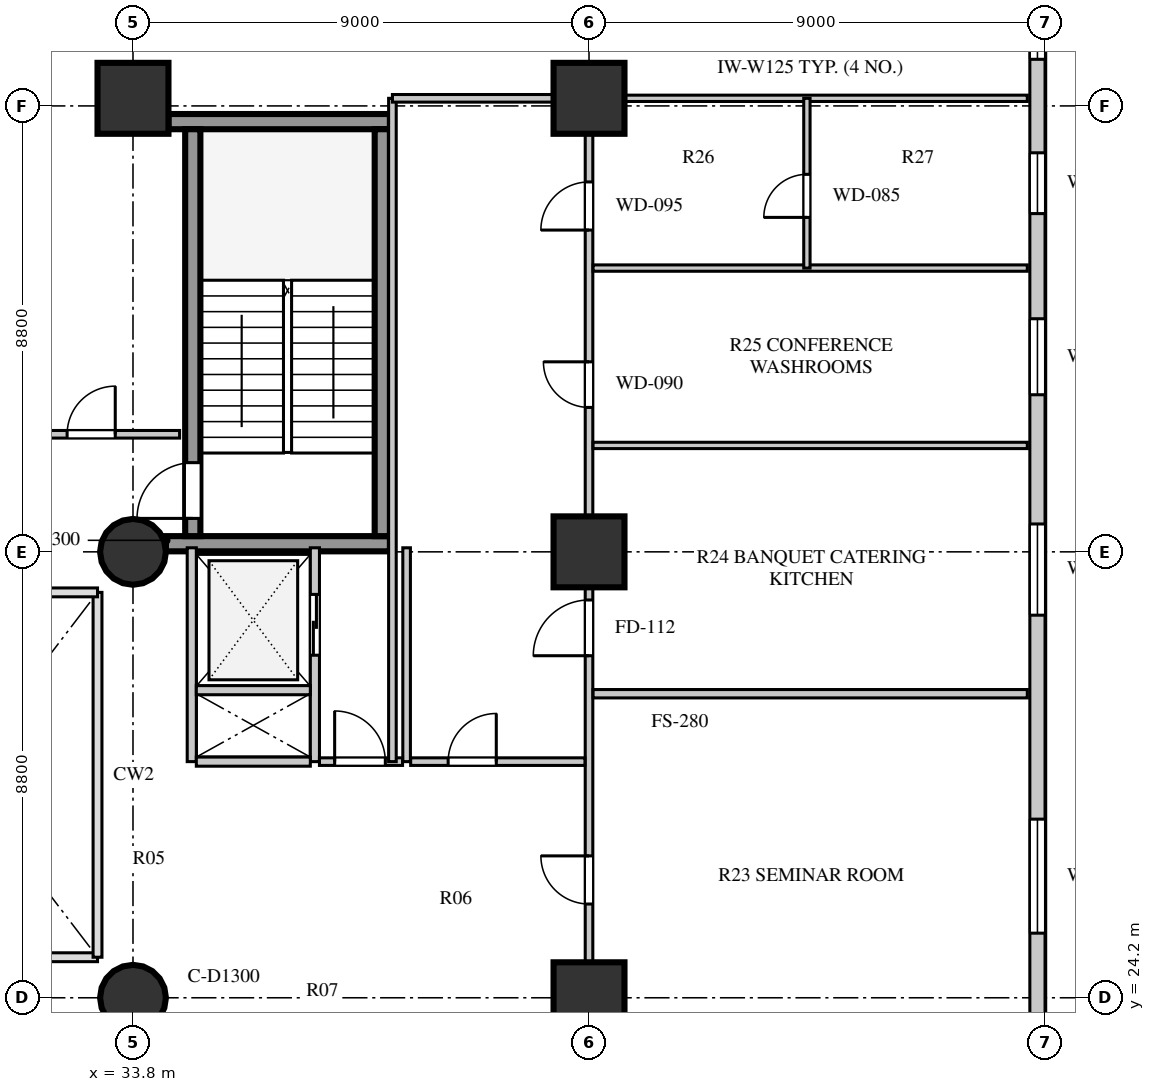
"""IFC4 building model, lengths in metres.
Left out: names, types, materials, properties, quantities, classifications, styles, units other than length and angle.
Written with IfcOpenShell. Run it as: python <this file> out.ifc"""

import sys

from ifc_helpers import new_model, si_unit, direction, frame, frame_2d, origin, origin_2d, place, context, subcontext, project, spatial, rectangle, circle, extrude, element, fill, save


model = new_model("IFC4")
c1 = context("Model", 3, precision=1e-05, world=origin(), true_north=direction((0.0, 1.0)))
c2 = subcontext(c1, "Body", "Model", "MODEL_VIEW")
j1 = project(units=[si_unit("LENGTHUNIT", "METRE"), si_unit("PLANEANGLEUNIT", "RADIAN")], contexts=[c1])
p1 = place(None, origin())
s1 = spatial("IfcSite", under=j1, at=p1, CompositionType="ELEMENT")
p2 = place(p1, origin())
s2 = spatial("IfcBuilding", under=s1, at=p2, CompositionType="ELEMENT")
p3 = place(p2, frame((0.0, 0.0, 21.5)))
s3 = spatial("IfcBuildingStorey", under=s2, at=p3, CompositionType="ELEMENT", Elevation=21.5)
p4 = place(p3, frame((34.45, 33.16, 0.0), z_axis=(0.0, 0.0, 1.0), x_axis=(1.0, 0.0, 0.0)))
e1 = element("IfcWall", 1, at=p4, inside=s3, PredefinedType="SHEAR", context=c2, shape_type="SweptSolid", body=[
    extrude(rectangle(XDim=4.42, YDim=0.3, at=frame_2d((2.21, 0.0))), origin(), (0.0, 0.0, 1.0), 4.22),
])
p5 = place(p3, frame((34.5, 41.49, 0.0), z_axis=(0.0, 0.0, 1.0), x_axis=(1.0, 0.0, 0.0)))
e2 = element("IfcWall", 2, at=p5, inside=s3, PredefinedType="SHEAR", context=c2, shape_type="SweptSolid", body=[
    extrude(rectangle(XDim=4.37, YDim=0.3, at=frame_2d((2.185, 0.0))), origin(), (0.0, 0.0, 1.0), 4.22),
])
p6 = place(p3, frame((34.98, 33.31, 0.0), z_axis=(0.0, 0.0, 1.0), x_axis=(0.0, 1.0, 0.0)))
e3 = element("IfcWall", 3, at=p6, inside=s3, PredefinedType="SHEAR", context=c2, shape_type="SweptSolid", body=[
    extrude(rectangle(XDim=8.03, YDim=0.3, at=frame_2d((4.015, 0.0))), origin(), (0.0, 0.0, 1.0), 4.22),
])
p7 = place(p6, frame((0.35, 0.0, 0.0)))
e4 = element("IfcOpeningElement", 4, at=p7, cuts=e3, PredefinedType="OPENING", context=c2, shape_type="SweptSolid", body=[
    extrude(rectangle(XDim=1.1, YDim=2.1, at=frame_2d((0.55, 1.05))), frame((0.0, 0.16, 0.0), z_axis=(0.0, -1.0, 0.0), x_axis=(1.0, 0.0, 0.0)), (0.0, 0.0, 1.0), 0.32),
])
p8 = place(p3, frame((38.72, 33.31, 0.0), z_axis=(0.0, 0.0, 1.0), x_axis=(0.0, 1.0, 0.0)))
e5 = element("IfcWall", 5, at=p8, inside=s3, PredefinedType="SHEAR", context=c2, shape_type="SweptSolid", body=[
    extrude(rectangle(XDim=8.03, YDim=0.3, at=frame_2d((4.015, 0.0))), origin(), (0.0, 0.0, 1.0), 4.22),
])
for number, where, z_axis, x_axis in (
    (6, (33.8, 24.2, 0.0), (0.0, 0.0, 1.0), (1.0, 0.0, 0.0)),
    (7, (33.8, 33.0, 0.0), (0.0, 0.0, 1.0), (1.0, 0.0, 0.0)),
):
    element("IfcColumn", number, at=place(p3, frame(where, z_axis=z_axis, x_axis=x_axis)), inside=s3, PredefinedType="COLUMN", context=c2, shape_type="SweptSolid", body=[
        extrude(circle(Radius=0.65, at=origin_2d()), origin(), (0.0, 0.0, 1.0), 4.22),
    ])
for number, where, z_axis, x_axis in (
    (8, (33.8, 41.95, 0.0), (0.0, 0.0, 1.0), (1.0, 0.0, 0.0)),
    (9, (42.8, 24.2, 0.0), (0.0, 0.0, 1.0), (1.0, 0.0, 0.0)),
    (10, (42.8, 33.0, 0.0), (0.0, 0.0, 1.0), (1.0, 0.0, 0.0)),
    (11, (42.8, 41.95, 0.0), (0.0, 0.0, 1.0), (1.0, 0.0, 0.0)),
):
    element("IfcColumn", number, at=place(p3, frame(where, z_axis=z_axis, x_axis=x_axis)), inside=s3, PredefinedType="COLUMN", context=c2, shape_type="SweptSolid", body=[
        extrude(rectangle(XDim=1.4, YDim=1.4, at=origin_2d()), origin(), (0.0, 0.0, 1.0), 4.22),
    ])
p9 = place(p3, frame((51.65, 12.4, 0.0), z_axis=(0.0, 0.0, 1.0), x_axis=(0.0, 1.0, 0.0)))
e12 = element("IfcWall", 12, at=p9, inside=s3, PredefinedType="STANDARD", context=c2, shape_type="SweptSolid", body=[
    extrude(rectangle(XDim=32.4, YDim=0.3, at=frame_2d((16.2, 0.0))), origin(), (0.0, 0.0, 1.0), 4.22),
])
p10 = place(p9, frame((0.655, 0.0, 0.8)))
e13 = element("IfcOpeningElement", 13, at=p10, cuts=e12, PredefinedType="OPENING", context=c2, shape_type="SweptSolid", body=[
    extrude(rectangle(XDim=1.65, YDim=1.95, at=frame_2d((0.825, 0.975))), frame((0.0, 0.16, 0.0), z_axis=(0.0, -1.0, 0.0), x_axis=(1.0, 0.0, 0.0)), (0.0, 0.0, 1.0), 0.32),
])
p11 = place(p9, frame((5.75, 0.0, 0.8)))
e14 = element("IfcOpeningElement", 14, at=p11, cuts=e12, PredefinedType="OPENING", context=c2, shape_type="SweptSolid", body=[
    extrude(rectangle(XDim=1.95, YDim=2.0, at=frame_2d((0.975, 1.0))), frame((0.0, 0.16, 0.0), z_axis=(0.0, -1.0, 0.0), x_axis=(1.0, 0.0, 0.0)), (0.0, 0.0, 1.0), 0.32),
])
p12 = place(p9, frame((13.075, 0.0, 0.8)))
e15 = element("IfcOpeningElement", 15, at=p12, cuts=e12, PredefinedType="OPENING", context=c2, shape_type="SweptSolid", body=[
    extrude(rectangle(XDim=2.25, YDim=2.0, at=frame_2d((1.125, 1.0))), frame((0.0, 0.16, 0.0), z_axis=(0.0, -1.0, 0.0), x_axis=(1.0, 0.0, 0.0)), (0.0, 0.0, 1.0), 0.32),
])
p13 = place(p9, frame((19.35, 0.0, 0.8)))
e16 = element("IfcOpeningElement", 16, at=p13, cuts=e12, PredefinedType="OPENING", context=c2, shape_type="SweptSolid", body=[
    extrude(rectangle(XDim=1.8, YDim=2.0, at=frame_2d((0.9, 1.0))), frame((0.0, 0.16, 0.0), z_axis=(0.0, -1.0, 0.0), x_axis=(1.0, 0.0, 0.0)), (0.0, 0.0, 1.0), 0.32),
])
p14 = place(p9, frame((23.7, 0.0, 0.8)))
e17 = element("IfcOpeningElement", 17, at=p14, cuts=e12, PredefinedType="OPENING", context=c2, shape_type="SweptSolid", body=[
    extrude(rectangle(XDim=1.5, YDim=2.0, at=frame_2d((0.75, 1.0))), frame((0.0, 0.16, 0.0), z_axis=(0.0, -1.0, 0.0), x_axis=(1.0, 0.0, 0.0)), (0.0, 0.0, 1.0), 0.32),
])
p15 = place(p9, frame((27.275, 0.0, 0.8)))
e18 = element("IfcOpeningElement", 18, at=p15, cuts=e12, PredefinedType="OPENING", context=c2, shape_type="SweptSolid", body=[
    extrude(rectangle(XDim=1.2, YDim=1.75, at=frame_2d((0.6, 0.875))), frame((0.0, 0.16, 0.0), z_axis=(0.0, -1.0, 0.0), x_axis=(1.0, 0.0, 0.0)), (0.0, 0.0, 1.0), 0.32),
])
p16 = place(p9, frame((30.32, 0.0, 0.8)))
e19 = element("IfcOpeningElement", 19, at=p16, cuts=e12, PredefinedType="OPENING", context=c2, shape_type="SweptSolid", body=[
    extrude(rectangle(XDim=1.2, YDim=1.75, at=frame_2d((0.6, 0.875))), frame((0.0, 0.16, 0.0), z_axis=(0.0, -1.0, 0.0), x_axis=(1.0, 0.0, 0.0)), (0.0, 0.0, 1.0), 0.32),
])
p17 = place(p3, frame((34.96, 28.86, 0.0), z_axis=(0.0, 0.0, 1.0), x_axis=(0.0, 1.0, 0.0)))
e20 = element("IfcWall", 20, at=p17, inside=s3, PredefinedType="SOLIDWALL", context=c2, shape_type="SweptSolid", body=[
    extrude(rectangle(XDim=4.22, YDim=0.18, at=frame_2d((2.11, 0.0))), origin(), (0.0, 0.0, 1.0), 4.22),
])
p18 = place(p3, frame((37.39, 28.86, 0.0), z_axis=(0.0, 0.0, 1.0), x_axis=(0.0, 1.0, 0.0)))
e21 = element("IfcWall", 21, at=p18, inside=s3, PredefinedType="SOLIDWALL", context=c2, shape_type="SweptSolid", body=[
    extrude(rectangle(XDim=4.22, YDim=0.18, at=frame_2d((2.11, 0.0))), origin(), (0.0, 0.0, 1.0), 4.22),
])
p19 = place(p18, frame((2.1, 0.0, 0.0)))
e22 = element("IfcOpeningElement", 22, at=p19, cuts=e21, PredefinedType="OPENING", context=c2, shape_type="SweptSolid", body=[
    extrude(rectangle(XDim=1.2, YDim=2.12, at=frame_2d((0.6, 1.06))), frame((0.0, 0.1, 0.0), z_axis=(0.0, -1.0, 0.0), x_axis=(1.0, 0.0, 0.0)), (0.0, 0.0, 1.0), 0.2),
])
for number, where, z_axis, x_axis in (
    (23, (35.05, 28.86, 0.0), (0.0, 0.0, 1.0), (1.0, 0.0, 0.0)),
    (24, (35.05, 30.27, 0.0), (0.0, 0.0, 1.0), (1.0, 0.0, 0.0)),
):
    element("IfcWall", number, at=place(p3, frame(where, z_axis=z_axis, x_axis=x_axis)), inside=s3, PredefinedType="SOLIDWALL", context=c2, shape_type="SweptSolid", body=[
        extrude(rectangle(XDim=2.25, YDim=0.18, at=frame_2d((1.125, 0.0))), origin(), (0.0, 0.0, 1.0), 4.22),
    ])
p20 = place(p3, frame((39.2, 28.86, 0.0), z_axis=(0.0, 0.0, 1.0), x_axis=(0.0, 1.0, 0.0)))
e25 = element("IfcWall", 25, at=p20, inside=s3, PredefinedType="PARTITIONING", context=c2, shape_type="SweptSolid", body=[
    extrude(rectangle(XDim=4.22, YDim=0.15, at=frame_2d((2.11, 0.0))), origin(), (0.0, 0.0, 1.0), 4.22),
])
p21 = place(p3, frame((37.48, 28.86, 0.0), z_axis=(0.0, 0.0, 1.0), x_axis=(1.0, 0.0, 0.0)))
e26 = element("IfcWall", 26, at=p21, inside=s3, PredefinedType="PARTITIONING", context=c2, shape_type="SweptSolid", body=[
    extrude(rectangle(XDim=1.64, YDim=0.15, at=frame_2d((0.82, 0.0))), origin(), (0.0, 0.0, 1.0), 4.22),
])
p22 = place(p21, frame((0.3, 0.0, 0.0)))
e27 = element("IfcOpeningElement", 27, at=p22, cuts=e26, PredefinedType="OPENING", context=c2, shape_type="SweptSolid", body=[
    extrude(rectangle(XDim=1.0, YDim=2.1, at=frame_2d((0.5, 1.05))), frame((0.0, 0.085, 0.0), z_axis=(0.0, -1.0, 0.0), x_axis=(1.0, 0.0, 0.0)), (0.0, 0.0, 1.0), 0.17),
])
p23 = place(p3, frame((27.5, 35.32, 0.0), z_axis=(0.0, 0.0, 1.0), x_axis=(1.0, 0.0, 0.0)))
e28 = element("IfcWall", 28, at=p23, inside=s3, PredefinedType="PARTITIONING", context=c2, shape_type="SweptSolid", body=[
    extrude(rectangle(XDim=7.22, YDim=0.15, at=frame_2d((3.61, 0.0))), origin(), (0.0, 0.0, 1.0), 4.22),
])
p24 = place(p23, frame((5.0, 0.0, 0.0)))
e29 = element("IfcOpeningElement", 29, at=p24, cuts=e28, PredefinedType="OPENING", context=c2, shape_type="SweptSolid", body=[
    extrude(rectangle(XDim=0.95, YDim=2.08, at=frame_2d((0.475, 1.04))), frame((0.0, 0.085, 0.0), z_axis=(0.0, -1.0, 0.0), x_axis=(1.0, 0.0, 0.0)), (0.0, 0.0, 1.0), 0.17),
])
p25 = place(p23, frame((2.0, 0.0, 0.0)))
e30 = element("IfcOpeningElement", 30, at=p25, cuts=e28, PredefinedType="OPENING", context=c2, shape_type="SweptSolid", body=[
    extrude(rectangle(XDim=1.35, YDim=2.1, at=frame_2d((0.675, 1.05))), frame((0.0, 0.085, 0.0), z_axis=(0.0, -1.0, 0.0), x_axis=(1.0, 0.0, 0.0)), (0.0, 0.0, 1.0), 0.17),
])
p26 = place(p3, frame((42.8, 15.25, 0.0), z_axis=(0.0, 0.0, 1.0), x_axis=(0.0, 1.0, 0.0)))
e31 = element("IfcWall", 31, at=p26, inside=s3, PredefinedType="PARTITIONING", context=c2, shape_type="SweptSolid", body=[
    extrude(rectangle(XDim=26.7, YDim=0.15, at=frame_2d((13.35, 0.0))), origin(), (0.0, 0.0, 1.0), 3.42),
])
p27 = place(p26, frame((2.6, 0.0, 0.0)))
e32 = element("IfcOpeningElement", 32, at=p27, cuts=e31, PredefinedType="OPENING", context=c2, shape_type="SweptSolid", body=[
    extrude(rectangle(XDim=0.95, YDim=2.08, at=frame_2d((0.475, 1.04))), frame((0.0, 0.085, 0.0), z_axis=(0.0, -1.0, 0.0), x_axis=(1.0, 0.0, 0.0)), (0.0, 0.0, 1.0), 0.17),
])
p28 = place(p26, frame((10.8, 0.0, 0.0)))
e33 = element("IfcOpeningElement", 33, at=p28, cuts=e31, PredefinedType="OPENING", context=c2, shape_type="SweptSolid", body=[
    extrude(rectangle(XDim=0.95, YDim=2.08, at=frame_2d((0.475, 1.04))), frame((0.0, 0.085, 0.0), z_axis=(0.0, -1.0, 0.0), x_axis=(1.0, 0.0, 0.0)), (0.0, 0.0, 1.0), 0.17),
])
p29 = place(p26, frame((15.7, 0.0, 0.0)))
e34 = element("IfcOpeningElement", 34, at=p29, cuts=e31, PredefinedType="OPENING", context=c2, shape_type="SweptSolid", body=[
    extrude(rectangle(XDim=1.1, YDim=2.12, at=frame_2d((0.55, 1.06))), frame((0.0, 0.085, 0.0), z_axis=(0.0, -1.0, 0.0), x_axis=(1.0, 0.0, 0.0)), (0.0, 0.0, 1.0), 0.17),
])
p30 = place(p26, frame((20.6, 0.0, 0.0)))
e35 = element("IfcOpeningElement", 35, at=p30, cuts=e31, PredefinedType="OPENING", context=c2, shape_type="SweptSolid", body=[
    extrude(rectangle(XDim=0.9, YDim=2.05, at=frame_2d((0.45, 1.025))), frame((0.0, 0.085, 0.0), z_axis=(0.0, -1.0, 0.0), x_axis=(1.0, 0.0, 0.0)), (0.0, 0.0, 1.0), 0.17),
])
p31 = place(p26, frame((24.1, 0.0, 0.0)))
e36 = element("IfcOpeningElement", 36, at=p31, cuts=e31, PredefinedType="OPENING", context=c2, shape_type="SweptSolid", body=[
    extrude(rectangle(XDim=0.95, YDim=2.05, at=frame_2d((0.475, 1.025))), frame((0.0, 0.085, 0.0), z_axis=(0.0, -1.0, 0.0), x_axis=(1.0, 0.0, 0.0)), (0.0, 0.0, 1.0), 0.17),
])
p32 = place(p3, frame((42.88, 41.95, 0.0), z_axis=(0.0, 0.0, 1.0), x_axis=(1.0, 0.0, 0.0)))
e37 = element("IfcWall", 37, at=p32, inside=s3, PredefinedType="PLUMBINGWALL", context=c2, shape_type="SweptSolid", body=[
    extrude(rectangle(XDim=8.57, YDim=0.125, at=frame_2d((4.285, 0.0))), origin(), (0.0, 0.0, 1.0), 3.72),
])
p33 = place(p3, frame((39.28, 28.86, 0.0), z_axis=(0.0, 0.0, 1.0), x_axis=(1.0, 0.0, 0.0)))
e38 = element("IfcWall", 38, at=p33, inside=s3, PredefinedType="PARTITIONING", context=c2, shape_type="SweptSolid", body=[
    extrude(rectangle(XDim=3.44, YDim=0.15, at=frame_2d((1.72, 0.0))), origin(), (0.0, 0.0, 1.0), 4.22),
])
p34 = place(p33, frame((0.74, 0.0, 0.0)))
e39 = element("IfcOpeningElement", 39, at=p34, cuts=e38, PredefinedType="OPENING", context=c2, shape_type="SweptSolid", body=[
    extrude(rectangle(XDim=0.95, YDim=2.08, at=frame_2d((0.475, 1.04))), frame((0.0, 0.085, 0.0), z_axis=(0.0, -1.0, 0.0), x_axis=(1.0, 0.0, 0.0)), (0.0, 0.0, 1.0), 0.17),
])
p35 = place(p3, frame((38.92, 28.86, 0.0), z_axis=(0.0, 0.0, 1.0), x_axis=(0.0, 1.0, 0.0)))
e40 = element("IfcWall", 40, at=p35, inside=s3, PredefinedType="PARTITIONING", context=c2, shape_type="SweptSolid", body=[
    extrude(rectangle(XDim=13.09, YDim=0.15, at=frame_2d((6.545, 0.0))), origin(), (0.0, 0.0, 1.0), 4.22),
])
p36 = place(p3, frame((38.92, 41.95, 0.0), z_axis=(0.0, 0.0, 1.0), x_axis=(1.0, 0.0, 0.0)))
e41 = element("IfcWall", 41, at=p36, inside=s3, PredefinedType="PARTITIONING", context=c2, shape_type="SweptSolid", body=[
    extrude(rectangle(XDim=3.88, YDim=0.15, at=frame_2d((1.94, 0.0))), origin(), (0.0, 0.0, 1.0), 3.42),
])
p37 = place(p3, frame((42.88, 30.2, 0.0), z_axis=(0.0, 0.0, 1.0), x_axis=(1.0, 0.0, 0.0)))
e42 = element("IfcWall", 42, at=p37, inside=s3, PredefinedType="PARTITIONING", context=c2, shape_type="SweptSolid", body=[
    extrude(rectangle(XDim=8.57, YDim=0.165, at=frame_2d((4.285, 0.0))), origin(), (0.0, 0.0, 1.0), 4.22),
])
for number, where, z_axis, x_axis in (
    (43, (42.88, 35.1, 0.0), (0.0, 0.0, 1.0), (1.0, 0.0, 0.0)),
    (44, (42.88, 38.6, 0.0), (0.0, 0.0, 1.0), (1.0, 0.0, 0.0)),
):
    element("IfcWall", number, at=place(p3, frame(where, z_axis=z_axis, x_axis=x_axis)), inside=s3, PredefinedType="PLUMBINGWALL", context=c2, shape_type="SweptSolid", body=[
        extrude(rectangle(XDim=8.57, YDim=0.125, at=frame_2d((4.285, 0.0))), origin(), (0.0, 0.0, 1.0), 4.22),
    ])
p38 = place(p3, frame((47.1, 38.6, 0.0), z_axis=(0.0, 0.0, 1.0), x_axis=(0.0, 1.0, 0.0)))
e45 = element("IfcWall", 45, at=p38, inside=s3, PredefinedType="PLUMBINGWALL", context=c2, shape_type="SweptSolid", body=[
    extrude(rectangle(XDim=3.35, YDim=0.125, at=frame_2d((1.675, 0.0))), origin(), (0.0, 0.0, 1.0), 4.22),
])
p39 = place(p38, frame((1.0, 0.0, 0.0)))
e46 = element("IfcOpeningElement", 46, at=p39, cuts=e45, PredefinedType="OPENING", context=c2, shape_type="SweptSolid", body=[
    extrude(rectangle(XDim=0.85, YDim=2.05, at=frame_2d((0.425, 1.025))), frame((0.0, 0.073, 0.0), z_axis=(0.0, -1.0, 0.0), x_axis=(1.0, 0.0, 0.0)), (0.0, 0.0, 1.0), 0.145),
])
p40 = place(p12, origin())
e47 = element("IfcWindow", 47, at=p40, inside=s3, PartitioningType="SINGLE_PANEL", PredefinedType="WINDOW", context=c2, shape_type="SweptSolid", body=[
    extrude(rectangle(XDim=2.25, YDim=2.0, at=frame_2d((1.125, 1.0))), frame((0.0, 0.03, 0.0), z_axis=(0.0, -1.0, 0.0), x_axis=(1.0, 0.0, 0.0)), (0.0, 0.0, 1.0), 0.06),
])
fill(e15, e47)
p41 = place(p13, origin())
e48 = element("IfcWindow", 48, at=p41, inside=s3, PartitioningType="SINGLE_PANEL", PredefinedType="WINDOW", context=c2, shape_type="SweptSolid", body=[
    extrude(rectangle(XDim=1.8, YDim=2.0, at=frame_2d((0.9, 1.0))), frame((0.0, 0.03, 0.0), z_axis=(0.0, -1.0, 0.0), x_axis=(1.0, 0.0, 0.0)), (0.0, 0.0, 1.0), 0.06),
])
fill(e16, e48)
p42 = place(p14, origin())
e49 = element("IfcWindow", 49, at=p42, inside=s3, PartitioningType="SINGLE_PANEL", PredefinedType="WINDOW", context=c2, shape_type="SweptSolid", body=[
    extrude(rectangle(XDim=1.5, YDim=2.0, at=frame_2d((0.75, 1.0))), frame((0.0, 0.03, 0.0), z_axis=(0.0, -1.0, 0.0), x_axis=(1.0, 0.0, 0.0)), (0.0, 0.0, 1.0), 0.06),
])
fill(e17, e49)
p43 = place(p15, origin())
e50 = element("IfcWindow", 50, at=p43, inside=s3, PartitioningType="SINGLE_PANEL", PredefinedType="WINDOW", context=c2, shape_type="SweptSolid", body=[
    extrude(rectangle(XDim=1.2, YDim=1.75, at=frame_2d((0.6, 0.875))), frame((0.0, 0.03, 0.0), z_axis=(0.0, -1.0, 0.0), x_axis=(1.0, 0.0, 0.0)), (0.0, 0.0, 1.0), 0.06),
])
fill(e18, e50)
p44 = place(p16, origin())
e51 = element("IfcWindow", 51, at=p44, inside=s3, PartitioningType="SINGLE_PANEL", PredefinedType="WINDOW", context=c2, shape_type="SweptSolid", body=[
    extrude(rectangle(XDim=1.2, YDim=1.75, at=frame_2d((0.6, 0.875))), frame((0.0, 0.03, 0.0), z_axis=(0.0, -1.0, 0.0), x_axis=(1.0, 0.0, 0.0)), (0.0, 0.0, 1.0), 0.06),
])
fill(e19, e51)
p45 = place(p7, origin())
e52 = element("IfcDoor", 52, at=p45, inside=s3, OperationType="SINGLE_SWING_LEFT", PredefinedType="DOOR", context=c2, shape_type="SweptSolid", body=[
    extrude(rectangle(XDim=1.1, YDim=2.1, at=frame_2d((0.55, 1.05))), frame((0.0, 0.025, 0.0), z_axis=(0.0, -1.0, 0.0), x_axis=(1.0, 0.0, 0.0)), (0.0, 0.0, 1.0), 0.05),
])
fill(e4, e52)
p46 = place(p19, frame((1.2, 0.0, 0.0), z_axis=(0.0, 0.0, 1.0), x_axis=(-1.0, 0.0, 0.0)))
e53 = element("IfcDoor", 53, at=p46, inside=s3, OperationType="DOUBLE_DOOR_SLIDING", PredefinedType="DOOR", context=c2, shape_type="SweptSolid", body=[
    extrude(rectangle(XDim=1.2, YDim=2.12, at=frame_2d((0.6, 1.06))), frame((0.0, 0.025, 0.0), z_axis=(0.0, -1.0, 0.0), x_axis=(1.0, 0.0, 0.0)), (0.0, 0.0, 1.0), 0.05),
])
fill(e22, e53)
p47 = place(p22, origin())
e54 = element("IfcDoor", 54, at=p47, inside=s3, OperationType="SINGLE_SWING_LEFT", PredefinedType="DOOR", context=c2, shape_type="SweptSolid", body=[
    extrude(rectangle(XDim=1.0, YDim=2.1, at=frame_2d((0.5, 1.05))), frame((0.0, 0.025, 0.0), z_axis=(0.0, -1.0, 0.0), x_axis=(1.0, 0.0, 0.0)), (0.0, 0.0, 1.0), 0.05),
])
fill(e27, e54)
p48 = place(p34, frame((0.95, 0.0, 0.0), z_axis=(0.0, 0.0, 1.0), x_axis=(-1.0, 0.0, 0.0)))
e55 = element("IfcDoor", 55, at=p48, inside=s3, OperationType="SINGLE_SWING_LEFT", PredefinedType="DOOR", context=c2, shape_type="SweptSolid", body=[
    extrude(rectangle(XDim=0.95, YDim=2.08, at=frame_2d((0.475, 1.04))), frame((0.0, 0.025, 0.0), z_axis=(0.0, -1.0, 0.0), x_axis=(1.0, 0.0, 0.0)), (0.0, 0.0, 1.0), 0.05),
])
fill(e39, e55)
p49 = place(p24, origin())
e56 = element("IfcDoor", 56, at=p49, inside=s3, OperationType="SINGLE_SWING_RIGHT", PredefinedType="DOOR", context=c2, shape_type="SweptSolid", body=[
    extrude(rectangle(XDim=0.95, YDim=2.08, at=frame_2d((0.475, 1.04))), frame((0.0, 0.025, 0.0), z_axis=(0.0, -1.0, 0.0), x_axis=(1.0, 0.0, 0.0)), (0.0, 0.0, 1.0), 0.05),
])
fill(e29, e56)
p50 = place(p39, origin())
e57 = element("IfcDoor", 57, at=p50, inside=s3, OperationType="SINGLE_SWING_LEFT", PredefinedType="DOOR", context=c2, shape_type="SweptSolid", body=[
    extrude(rectangle(XDim=0.85, YDim=2.05, at=frame_2d((0.425, 1.025))), frame((0.0, 0.025, 0.0), z_axis=(0.0, -1.0, 0.0), x_axis=(1.0, 0.0, 0.0)), (0.0, 0.0, 1.0), 0.05),
])
fill(e46, e57)
p51 = place(p28, origin())
e58 = element("IfcDoor", 58, at=p51, inside=s3, OperationType="SINGLE_SWING_RIGHT", PredefinedType="DOOR", context=c2, shape_type="SweptSolid", body=[
    extrude(rectangle(XDim=0.95, YDim=2.08, at=frame_2d((0.475, 1.04))), frame((0.0, 0.025, 0.0), z_axis=(0.0, -1.0, 0.0), x_axis=(1.0, 0.0, 0.0)), (0.0, 0.0, 1.0), 0.05),
])
fill(e33, e58)
p52 = place(p29, origin())
e59 = element("IfcDoor", 59, at=p52, inside=s3, OperationType="SINGLE_SWING_LEFT", PredefinedType="DOOR", context=c2, shape_type="SweptSolid", body=[
    extrude(rectangle(XDim=1.1, YDim=2.12, at=frame_2d((0.55, 1.06))), frame((0.0, 0.025, 0.0), z_axis=(0.0, -1.0, 0.0), x_axis=(1.0, 0.0, 0.0)), (0.0, 0.0, 1.0), 0.05),
])
fill(e34, e59)
p53 = place(p30, origin())
e60 = element("IfcDoor", 60, at=p53, inside=s3, OperationType="SINGLE_SWING_RIGHT", PredefinedType="DOOR", context=c2, shape_type="SweptSolid", body=[
    extrude(rectangle(XDim=0.9, YDim=2.05, at=frame_2d((0.45, 1.025))), frame((0.0, 0.025, 0.0), z_axis=(0.0, -1.0, 0.0), x_axis=(1.0, 0.0, 0.0)), (0.0, 0.0, 1.0), 0.05),
])
fill(e35, e60)
p54 = place(p31, origin())
e61 = element("IfcDoor", 61, at=p54, inside=s3, OperationType="SINGLE_SWING_LEFT", PredefinedType="DOOR", context=c2, shape_type="SweptSolid", body=[
    extrude(rectangle(XDim=0.95, YDim=2.05, at=frame_2d((0.475, 1.025))), frame((0.0, 0.025, 0.0), z_axis=(0.0, -1.0, 0.0), x_axis=(1.0, 0.0, 0.0)), (0.0, 0.0, 1.0), 0.05),
])
fill(e36, e61)
save(model, sys.argv[1])
